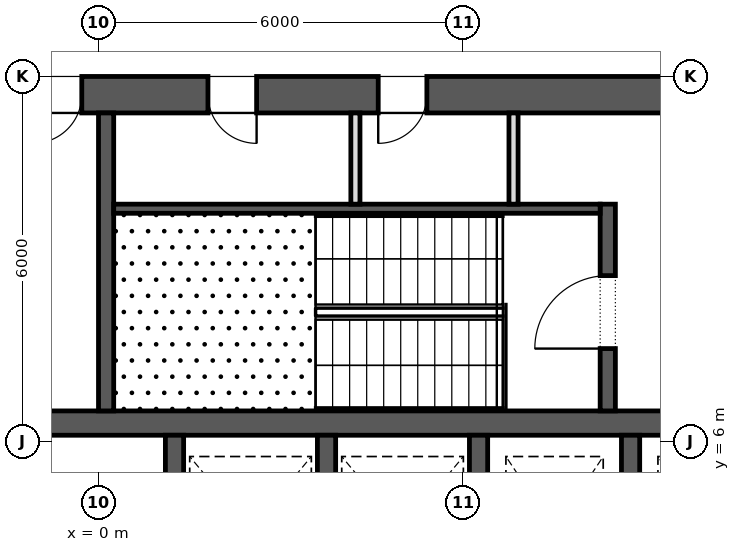
"""IFC4 building model, lengths in metres.
Left out: names, types, materials, properties, quantities, classifications, styles, units other than length and angle.
Written with IfcOpenShell. Run it as: python <this file> out.ifc"""

import sys

from ifc_helpers import new_model, si_unit, direction, frame, frame_2d, origin, place, context, subcontext, project, spatial, rectangle, extrude, element, fill, save


model = new_model("IFC4")
c1 = context("Model", 3, precision=1e-05, world=origin(), true_north=direction((0.0, 1.0)))
c2 = subcontext(c1, "Body", "Model", "MODEL_VIEW")
j1 = project(units=[si_unit("LENGTHUNIT", "METRE"), si_unit("PLANEANGLEUNIT", "RADIAN")], contexts=[c1])
p1 = place(None, origin())
s1 = spatial("IfcSite", under=j1, at=p1, CompositionType="ELEMENT")
p2 = place(p1, origin())
s2 = spatial("IfcBuilding", under=s1, at=p2, CompositionType="ELEMENT")
p3 = place(p2, frame((0.0, 0.0, 44.5)))
s3 = spatial("IfcBuildingStorey", under=s2, at=p3, CompositionType="ELEMENT", Elevation=44.5)
p4 = place(p3, frame((-12.0, 11.7, 0.0), z_axis=(0.0, 0.0, 1.0), x_axis=(1.0, 0.0, 0.0)))
e1 = element("IfcWall", 1, at=p4, inside=s3, PredefinedType="SHEAR", context=c2, shape_type="SweptSolid", body=[
    extrude(rectangle(XDim=24.0, YDim=0.6, at=frame_2d((12.0, 0.0))), origin(), (0.0, 0.0, 1.0), 4.2),
])
p5 = place(p4, frame((9.225, 0.0, 0.0)))
e2 = element("IfcOpeningElement", 2, at=p5, cuts=e1, PredefinedType="OPENING", context=c2, shape_type="SweptSolid", body=[
    extrude(rectangle(XDim=0.9, YDim=2.1, at=frame_2d((0.45, 1.05))), frame((0.0, 0.312, 0.0), z_axis=(0.0, -1.0, 0.0), x_axis=(1.0, 0.0, 0.0)), (0.0, 0.0, 1.0), 0.624),
])
p6 = place(p4, frame((10.925, 0.0, 0.0)))
e3 = element("IfcOpeningElement", 3, at=p6, cuts=e1, PredefinedType="OPENING", context=c2, shape_type="SweptSolid", body=[
    extrude(rectangle(XDim=0.8, YDim=2.1, at=frame_2d((0.4, 1.05))), frame((0.0, 0.312, 0.0), z_axis=(0.0, -1.0, 0.0), x_axis=(1.0, 0.0, 0.0)), (0.0, 0.0, 1.0), 0.624),
])
p7 = place(p4, frame((4.2, 0.0, 0.0)))
e4 = element("IfcOpeningElement", 4, at=p7, cuts=e1, PredefinedType="OPENING", context=c2, shape_type="SweptSolid", body=[
    extrude(rectangle(XDim=0.8, YDim=2.1, at=frame_2d((0.4, 1.05))), frame((0.0, 0.312, 0.0), z_axis=(0.0, -1.0, 0.0), x_axis=(1.0, 0.0, 0.0)), (0.0, 0.0, 1.0), 0.624),
])
p8 = place(p4, frame((13.8, 0.0, 0.0)))
e5 = element("IfcOpeningElement", 5, at=p8, cuts=e1, PredefinedType="OPENING", context=c2, shape_type="SweptSolid", body=[
    extrude(rectangle(XDim=0.8, YDim=2.1, at=frame_2d((0.4, 1.05))), frame((0.0, 0.312, 0.0), z_axis=(0.0, -1.0, 0.0), x_axis=(1.0, 0.0, 0.0)), (0.0, 0.0, 1.0), 0.624),
])
p9 = place(p4, frame((16.6, 0.0, 0.0)))
e6 = element("IfcOpeningElement", 6, at=p9, cuts=e1, PredefinedType="OPENING", context=c2, shape_type="SweptSolid", body=[
    extrude(rectangle(XDim=0.8, YDim=2.1, at=frame_2d((0.4, 1.05))), frame((0.0, 0.312, 0.0), z_axis=(0.0, -1.0, 0.0), x_axis=(1.0, 0.0, 0.0)), (0.0, 0.0, 1.0), 0.624),
])
p10 = place(p3, frame((-11.4, 6.3, 0.0), z_axis=(0.0, 0.0, 1.0), x_axis=(1.0, 0.0, 0.0)))
e7 = element("IfcWall", 7, at=p10, inside=s3, PredefinedType="SHEAR", context=c2, shape_type="SweptSolid", body=[
    extrude(rectangle(XDim=22.8, YDim=0.4, at=frame_2d((11.4, 0.0))), origin(), (0.0, 0.0, 1.0), 4.2),
])
p11 = place(p10, frame((20.85, 0.0, 0.0)))
e8 = element("IfcOpeningElement", 8, at=p11, cuts=e7, PredefinedType="OPENING", context=c2, shape_type="SweptSolid", body=[
    extrude(rectangle(XDim=1.1, YDim=2.1, at=frame_2d((0.55, 1.05))), frame((0.0, 0.212, 0.0), z_axis=(0.0, -1.0, 0.0), x_axis=(1.0, 0.0, 0.0)), (0.0, 0.0, 1.0), 0.424),
])
for number, where, z_axis, x_axis in (
    (9, (1.25, 3.2, 0.0), (0.0, 0.0, 1.0), (0.0, 1.0, 0.0)),
    (10, (3.75, 3.2, 0.0), (0.0, 0.0, 1.0), (0.0, 1.0, 0.0)),
    (11, (6.25, 3.2, 0.0), (0.0, 0.0, 1.0), (0.0, 1.0, 0.0)),
    (12, (8.75, 3.2, 0.0), (0.0, 0.0, 1.0), (0.0, 1.0, 0.0)),
):
    element("IfcWall", number, at=place(p3, frame(where, z_axis=z_axis, x_axis=x_axis)), inside=s3, PredefinedType="SHEAR", context=c2, shape_type="SweptSolid", body=[
        extrude(rectangle(XDim=2.9, YDim=0.3, at=frame_2d((1.45, 0.0))), origin(), (0.0, 0.0, 1.0), 4.2),
    ])
p12 = place(p3, frame((0.125, 6.5, 0.0), z_axis=(0.0, 0.0, 1.0), x_axis=(0.0, 1.0, 0.0)))
e13 = element("IfcWall", 13, at=p12, inside=s3, PredefinedType="SHEAR", context=c2, shape_type="SweptSolid", body=[
    extrude(rectangle(XDim=4.9, YDim=0.25, at=frame_2d((2.45, 0.0))), origin(), (0.0, 0.0, 1.0), 3.9),
])
p13 = place(p3, frame((8.375, 6.5, 0.0), z_axis=(0.0, 0.0, 1.0), x_axis=(0.0, 1.0, 0.0)))
e14 = element("IfcWall", 14, at=p13, inside=s3, PredefinedType="SHEAR", context=c2, shape_type="SweptSolid", body=[
    extrude(rectangle(XDim=3.4, YDim=0.25, at=frame_2d((1.7, 0.0))), origin(), (0.0, 0.0, 1.0), 3.9),
])
p14 = place(p13, frame((1.025, 0.0, 0.0)))
e15 = element("IfcOpeningElement", 15, at=p14, cuts=e14, PredefinedType="OPENING", context=c2, shape_type="SweptSolid", body=[
    extrude(rectangle(XDim=1.2, YDim=2.1, at=frame_2d((0.6, 1.05))), frame((0.0, 0.137, 0.0), z_axis=(0.0, -1.0, 0.0), x_axis=(1.0, 0.0, 0.0)), (0.0, 0.0, 1.0), 0.274),
])
p15 = place(p3, frame((0.25, 9.825, 0.0), z_axis=(0.0, 0.0, 1.0), x_axis=(1.0, 0.0, 0.0)))
e16 = element("IfcWall", 16, at=p15, inside=s3, PredefinedType="SHEAR", context=c2, shape_type="SweptSolid", body=[
    extrude(rectangle(XDim=8.0, YDim=0.15, at=frame_2d((4.0, 0.0))), origin(), (0.0, 0.0, 1.0), 3.9),
])
for number, where, z_axis, x_axis in (
    (17, (4.225, 9.9, 0.0), (0.0, 0.0, 1.0), (0.0, 1.0, 0.0)),
    (18, (6.825, 9.9, 0.0), (0.0, 0.0, 1.0), (0.0, 1.0, 0.0)),
):
    element("IfcWall", number, at=place(p3, frame(where, z_axis=z_axis, x_axis=x_axis)), inside=s3, PredefinedType="PARTITIONING", context=c2, shape_type="SweptSolid", body=[
        extrude(rectangle(XDim=1.5, YDim=0.15, at=frame_2d((0.75, 0.0))), origin(), (0.0, 0.0, 1.0), 3.9),
    ])
p16 = place(p14, origin())
e19 = element("IfcDoor", 19, at=p16, inside=s3, OperationType="SINGLE_SWING_RIGHT", PredefinedType="DOOR", context=c2, shape_type="SweptSolid", body=[
    extrude(rectangle(XDim=1.2, YDim=2.1, at=frame_2d((0.6, 1.05))), frame((0.0, 0.025, 0.0), z_axis=(0.0, -1.0, 0.0), x_axis=(1.0, 0.0, 0.0)), (0.0, 0.0, 1.0), 0.05),
])
fill(e15, e19)
p17 = place(p6, frame((0.8, 0.0, 0.0), z_axis=(0.0, 0.0, 1.0), x_axis=(-1.0, 0.0, 0.0)))
e20 = element("IfcDoor", 20, at=p17, inside=s3, OperationType="SINGLE_SWING_LEFT", PredefinedType="DOOR", context=c2, shape_type="SweptSolid", body=[
    extrude(rectangle(XDim=0.8, YDim=2.1, at=frame_2d((0.4, 1.05))), frame((0.0, 0.025, 0.0), z_axis=(0.0, -1.0, 0.0), x_axis=(1.0, 0.0, 0.0)), (0.0, 0.0, 1.0), 0.05),
])
fill(e3, e20)
p18 = place(p8, frame((0.8, 0.0, 0.0), z_axis=(0.0, 0.0, 1.0), x_axis=(-1.0, 0.0, 0.0)))
e21 = element("IfcDoor", 21, at=p18, inside=s3, OperationType="SINGLE_SWING_RIGHT", PredefinedType="DOOR", context=c2, shape_type="SweptSolid", body=[
    extrude(rectangle(XDim=0.8, YDim=2.1, at=frame_2d((0.4, 1.05))), frame((0.0, 0.025, 0.0), z_axis=(0.0, -1.0, 0.0), x_axis=(1.0, 0.0, 0.0)), (0.0, 0.0, 1.0), 0.05),
])
fill(e5, e21)
p19 = place(p9, frame((0.8, 0.0, 0.0), z_axis=(0.0, 0.0, 1.0), x_axis=(-1.0, 0.0, 0.0)))
e22 = element("IfcDoor", 22, at=p19, inside=s3, OperationType="SINGLE_SWING_LEFT", PredefinedType="DOOR", context=c2, shape_type="SweptSolid", body=[
    extrude(rectangle(XDim=0.8, YDim=2.1, at=frame_2d((0.4, 1.05))), frame((0.0, 0.025, 0.0), z_axis=(0.0, -1.0, 0.0), x_axis=(1.0, 0.0, 0.0)), (0.0, 0.0, 1.0), 0.05),
])
fill(e6, e22)
save(model, sys.argv[1])
